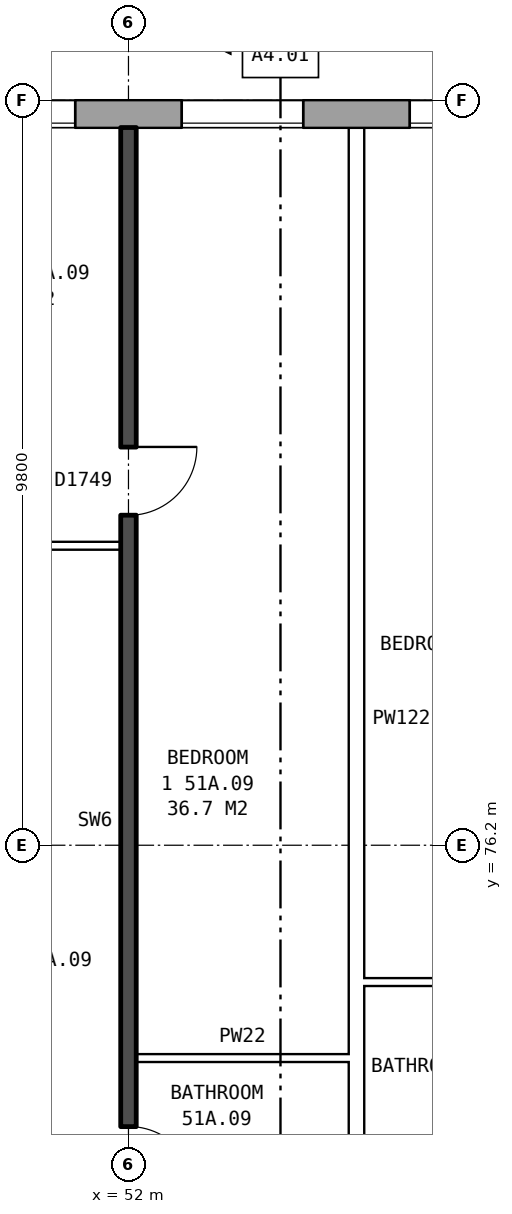
"""IFC4 building model, lengths in metres.
Left out: names, types, materials, properties, quantities, classifications, styles, units other than length and angle.
Written with IfcOpenShell. Run it as: python <this file> out.ifc"""

import sys

from ifc_helpers import new_model, si_unit, direction, frame, frame_2d, origin, place, context, subcontext, project, spatial, rectangle, extrude, element, fill, save


model = new_model("IFC4")
c1 = context("Model", 3, precision=1e-05, world=origin(), true_north=direction((0.0, 1.0)))
c2 = subcontext(c1, "Body", "Model", "MODEL_VIEW")
j1 = project(units=[si_unit("LENGTHUNIT", "METRE"), si_unit("PLANEANGLEUNIT", "RADIAN")], contexts=[c1])
p1 = place(None, origin())
s1 = spatial("IfcSite", under=j1, at=p1, CompositionType="ELEMENT")
p2 = place(p1, origin())
s2 = spatial("IfcBuilding", under=s1, at=p2, CompositionType="ELEMENT")
p3 = place(p2, frame((0.0, 0.0, 182.0)))
s3 = spatial("IfcBuildingStorey", under=s2, at=p3, CompositionType="ELEMENT", Elevation=182.0)
p4 = place(p3, frame((72.925, 85.82, 0.0), z_axis=(0.0, 0.0, 1.0), x_axis=(-1.0, 0.0, 0.0)))
e1 = element("IfcWall", 1, at=p4, inside=s3, PredefinedType="STANDARD", context=c2, shape_type="SweptSolid", body=[
    extrude(rectangle(XDim=39.601, YDim=0.36, at=frame_2d((19.8, 0.0))), origin(), (0.0, 0.0, 1.0), 2.85),
])
p5 = place(p4, frame((0.625, 0.0, 0.8)))
e2 = element("IfcOpeningElement", 2, at=p5, cuts=e1, PredefinedType="OPENING", context=c2, shape_type="SweptSolid", body=[
    extrude(rectangle(XDim=1.6, YDim=1.8, at=frame_2d((0.8, 0.9))), frame((0.0, 0.19, 0.0), z_axis=(0.0, -1.0, 0.0), x_axis=(1.0, 0.0, 0.0)), (0.0, 0.0, 1.0), 0.38),
])
p6 = place(p4, frame((3.625, 0.0, 0.8)))
e3 = element("IfcOpeningElement", 3, at=p6, cuts=e1, PredefinedType="OPENING", context=c2, shape_type="SweptSolid", body=[
    extrude(rectangle(XDim=1.6, YDim=1.8, at=frame_2d((0.8, 0.9))), frame((0.0, 0.19, 0.0), z_axis=(0.0, -1.0, 0.0), x_axis=(1.0, 0.0, 0.0)), (0.0, 0.0, 1.0), 0.38),
])
p7 = place(p4, frame((6.625, 0.0, 0.8)))
e4 = element("IfcOpeningElement", 4, at=p7, cuts=e1, PredefinedType="OPENING", context=c2, shape_type="SweptSolid", body=[
    extrude(rectangle(XDim=1.6, YDim=1.8, at=frame_2d((0.8, 0.9))), frame((0.0, 0.19, 0.0), z_axis=(0.0, -1.0, 0.0), x_axis=(1.0, 0.0, 0.0)), (0.0, 0.0, 1.0), 0.38),
])
p8 = place(p4, frame((9.475, 0.0, 0.35)))
e5 = element("IfcOpeningElement", 5, at=p8, cuts=e1, PredefinedType="OPENING", context=c2, shape_type="SweptSolid", body=[
    extrude(rectangle(XDim=0.6, YDim=0.9, at=frame_2d((0.3, 0.45))), frame((0.0, 0.19, 0.0), z_axis=(0.0, -1.0, 0.0), x_axis=(1.0, 0.0, 0.0)), (0.0, 0.0, 1.0), 0.38),
])
p9 = place(p4, frame((12.625, 0.0, 0.8)))
e6 = element("IfcOpeningElement", 6, at=p9, cuts=e1, PredefinedType="OPENING", context=c2, shape_type="SweptSolid", body=[
    extrude(rectangle(XDim=1.6, YDim=1.8, at=frame_2d((0.8, 0.9))), frame((0.0, 0.19, 0.0), z_axis=(0.0, -1.0, 0.0), x_axis=(1.0, 0.0, 0.0)), (0.0, 0.0, 1.0), 0.38),
])
p10 = place(p4, frame((15.625, 0.0, 0.8)))
e7 = element("IfcOpeningElement", 7, at=p10, cuts=e1, PredefinedType="OPENING", context=c2, shape_type="SweptSolid", body=[
    extrude(rectangle(XDim=1.6, YDim=1.8, at=frame_2d((0.8, 0.9))), frame((0.0, 0.19, 0.0), z_axis=(0.0, -1.0, 0.0), x_axis=(1.0, 0.0, 0.0)), (0.0, 0.0, 1.0), 0.38),
])
p11 = place(p4, frame((18.625, 0.0, 0.8)))
e8 = element("IfcOpeningElement", 8, at=p11, cuts=e1, PredefinedType="OPENING", context=c2, shape_type="SweptSolid", body=[
    extrude(rectangle(XDim=1.6, YDim=1.8, at=frame_2d((0.8, 0.9))), frame((0.0, 0.19, 0.0), z_axis=(0.0, -1.0, 0.0), x_axis=(1.0, 0.0, 0.0)), (0.0, 0.0, 1.0), 0.38),
])
p12 = place(p4, frame((21.625, 0.0, 0.8)))
e9 = element("IfcOpeningElement", 9, at=p12, cuts=e1, PredefinedType="OPENING", context=c2, shape_type="SweptSolid", body=[
    extrude(rectangle(XDim=1.6, YDim=1.8, at=frame_2d((0.8, 0.9))), frame((0.0, 0.19, 0.0), z_axis=(0.0, -1.0, 0.0), x_axis=(1.0, 0.0, 0.0)), (0.0, 0.0, 1.0), 0.38),
])
p13 = place(p4, frame((24.625, 0.0, 0.8)))
e10 = element("IfcOpeningElement", 10, at=p13, cuts=e1, PredefinedType="OPENING", context=c2, shape_type="SweptSolid", body=[
    extrude(rectangle(XDim=1.6, YDim=1.8, at=frame_2d((0.8, 0.9))), frame((0.0, 0.19, 0.0), z_axis=(0.0, -1.0, 0.0), x_axis=(1.0, 0.0, 0.0)), (0.0, 0.0, 1.0), 0.38),
])
p14 = place(p4, frame((27.125, 0.0, 0.8)))
e11 = element("IfcOpeningElement", 11, at=p14, cuts=e1, PredefinedType="OPENING", context=c2, shape_type="SweptSolid", body=[
    extrude(rectangle(XDim=1.6, YDim=1.8, at=frame_2d((0.8, 0.9))), frame((0.0, 0.19, 0.0), z_axis=(0.0, -1.0, 0.0), x_axis=(1.0, 0.0, 0.0)), (0.0, 0.0, 1.0), 0.38),
])
p15 = place(p4, frame((29.025, 0.0, 0.8)))
e12 = element("IfcOpeningElement", 12, at=p15, cuts=e1, PredefinedType="OPENING", context=c2, shape_type="SweptSolid", body=[
    extrude(rectangle(XDim=0.6, YDim=0.9, at=frame_2d((0.3, 0.45))), frame((0.0, 0.19, 0.0), z_axis=(0.0, -1.0, 0.0), x_axis=(1.0, 0.0, 0.0)), (0.0, 0.0, 1.0), 0.38),
])
p16 = place(p4, frame((33.625, 0.0, 0.8)))
e13 = element("IfcOpeningElement", 13, at=p16, cuts=e1, PredefinedType="OPENING", context=c2, shape_type="SweptSolid", body=[
    extrude(rectangle(XDim=1.6, YDim=1.8, at=frame_2d((0.8, 0.9))), frame((0.0, 0.19, 0.0), z_axis=(0.0, -1.0, 0.0), x_axis=(1.0, 0.0, 0.0)), (0.0, 0.0, 1.0), 0.38),
])
p17 = place(p4, frame((36.625, 0.0, 0.8)))
e14 = element("IfcOpeningElement", 14, at=p17, cuts=e1, PredefinedType="OPENING", context=c2, shape_type="SweptSolid", body=[
    extrude(rectangle(XDim=1.6, YDim=1.8, at=frame_2d((0.8, 0.9))), frame((0.0, 0.19, 0.0), z_axis=(0.0, -1.0, 0.0), x_axis=(1.0, 0.0, 0.0)), (0.0, 0.0, 1.0), 0.38),
])
p18 = place(p4, frame((10.375, 0.0, 0.35)))
e15 = element("IfcOpeningElement", 15, at=p18, cuts=e1, PredefinedType="OPENING", context=c2, shape_type="SweptSolid", body=[
    extrude(rectangle(XDim=1.4, YDim=1.8, at=frame_2d((0.7, 0.9))), frame((0.0, 0.19, 0.0), z_axis=(0.0, -1.0, 0.0), x_axis=(1.0, 0.0, 0.0)), (0.0, 0.0, 1.0), 0.38),
])
p19 = place(p4, frame((30.775, 0.0, 1.7)))
e16 = element("IfcOpeningElement", 16, at=p19, cuts=e1, PredefinedType="OPENING", context=c2, shape_type="SweptSolid", body=[
    extrude(rectangle(XDim=0.6, YDim=0.9, at=frame_2d((0.3, 0.45))), frame((0.0, 0.19, 0.0), z_axis=(0.0, -1.0, 0.0), x_axis=(1.0, 0.0, 0.0)), (0.0, 0.0, 1.0), 0.38),
])
p20 = place(p4, frame((31.675, 0.0, 0.8)))
e17 = element("IfcOpeningElement", 17, at=p20, cuts=e1, PredefinedType="OPENING", context=c2, shape_type="SweptSolid", body=[
    extrude(rectangle(XDim=1.0, YDim=1.8, at=frame_2d((0.5, 0.9))), frame((0.0, 0.19, 0.0), z_axis=(0.0, -1.0, 0.0), x_axis=(1.0, 0.0, 0.0)), (0.0, 0.0, 1.0), 0.38),
])
for number, where, z_axis, x_axis in (
    (18, (52.1, 73.4, 0.0), (0.0, 0.0, 1.0), (1.0, 0.0, 0.0)),
    (19, (55.1, 74.4, 0.0), (0.0, 0.0, 1.0), (1.0, 0.0, 0.0)),
):
    element("IfcWall", number, at=place(p3, frame(where, z_axis=z_axis, x_axis=x_axis)), inside=s3, PredefinedType="PARTITIONING", context=c2, shape_type="SweptSolid", body=[
        extrude(rectangle(XDim=2.8, YDim=0.1, at=frame_2d((1.4, 0.0))), origin(), (0.0, 0.0, 1.0), 2.85),
    ])
p21 = place(p3, frame((49.0, 80.14, 0.0), z_axis=(0.0, 0.0, 1.0), x_axis=(1.0, 0.0, 0.0)))
e20 = element("IfcWall", 20, at=p21, inside=s3, PredefinedType="PARTITIONING", context=c2, shape_type="SweptSolid", body=[
    extrude(rectangle(XDim=2.9, YDim=0.1, at=frame_2d((1.45, 0.0))), origin(), (0.0, 0.0, 1.0), 2.85),
])
p22 = place(p21, frame((1.0, 0.0, 0.0)))
e21 = element("IfcOpeningElement", 21, at=p22, cuts=e20, PredefinedType="OPENING", context=c2, shape_type="SweptSolid", body=[
    extrude(rectangle(XDim=0.9, YDim=2.1, at=frame_2d((0.45, 1.05))), frame((0.0, 0.06, 0.0), z_axis=(0.0, -1.0, 0.0), x_axis=(1.0, 0.0, 0.0)), (0.0, 0.0, 1.0), 0.12),
])
p23 = place(p3, frame((52.0, 71.2, 0.0), z_axis=(0.0, 0.0, 1.0), x_axis=(0.0, 1.0, 0.0)))
e22 = element("IfcWall", 22, at=p23, inside=s3, PredefinedType="SOLIDWALL", context=c2, shape_type="SweptSolid", body=[
    extrude(rectangle(XDim=14.44, YDim=0.2, at=frame_2d((7.22, 0.0))), origin(), (0.0, 0.0, 1.0), 2.85),
])
p24 = place(p23, frame((9.34, 0.0, 0.0)))
e23 = element("IfcOpeningElement", 23, at=p24, cuts=e22, PredefinedType="OPENING", context=c2, shape_type="SweptSolid", body=[
    extrude(rectangle(XDim=0.9, YDim=2.1, at=frame_2d((0.45, 1.05))), frame((0.0, 0.11, 0.0), z_axis=(0.0, -1.0, 0.0), x_axis=(1.0, 0.0, 0.0)), (0.0, 0.0, 1.0), 0.22),
])
p25 = place(p23, frame((0.4, 0.0, 0.0)))
e24 = element("IfcOpeningElement", 24, at=p25, cuts=e22, PredefinedType="OPENING", context=c2, shape_type="SweptSolid", body=[
    extrude(rectangle(XDim=0.9, YDim=2.1, at=frame_2d((0.45, 1.05))), frame((0.0, 0.11, 0.0), z_axis=(0.0, -1.0, 0.0), x_axis=(1.0, 0.0, 0.0)), (0.0, 0.0, 1.0), 0.22),
])
p26 = place(p3, frame((55.0, 71.3, 0.0), z_axis=(0.0, 0.0, 1.0), x_axis=(0.0, 1.0, 0.0)))
e25 = element("IfcWall", 25, at=p26, inside=s3, PredefinedType="PARTITIONING", context=c2, shape_type="SweptSolid", body=[
    extrude(rectangle(XDim=14.34, YDim=0.2, at=frame_2d((7.17, 0.0))), origin(), (0.0, 0.0, 1.0), 2.85),
])
p27 = place(p10, origin())
e26 = element("IfcWindow", 26, at=p27, inside=s3, PartitioningType="SINGLE_PANEL", PredefinedType="WINDOW", context=c2, shape_type="SweptSolid", body=[
    extrude(rectangle(XDim=1.6, YDim=1.8, at=frame_2d((0.8, 0.9))), frame((0.0, 0.15, 0.0), z_axis=(0.0, -1.0, 0.0), x_axis=(1.0, 0.0, 0.0)), (0.0, 0.0, 1.0), 0.06),
])
fill(e7, e26)
p28 = place(p11, origin())
e27 = element("IfcWindow", 27, at=p28, inside=s3, PartitioningType="SINGLE_PANEL", PredefinedType="WINDOW", context=c2, shape_type="SweptSolid", body=[
    extrude(rectangle(XDim=1.6, YDim=1.8, at=frame_2d((0.8, 0.9))), frame((0.0, 0.15, 0.0), z_axis=(0.0, -1.0, 0.0), x_axis=(1.0, 0.0, 0.0)), (0.0, 0.0, 1.0), 0.06),
])
fill(e8, e27)
p29 = place(p12, origin())
e28 = element("IfcWindow", 28, at=p29, inside=s3, PartitioningType="SINGLE_PANEL", PredefinedType="WINDOW", context=c2, shape_type="SweptSolid", body=[
    extrude(rectangle(XDim=1.6, YDim=1.8, at=frame_2d((0.8, 0.9))), frame((0.0, 0.15, 0.0), z_axis=(0.0, -1.0, 0.0), x_axis=(1.0, 0.0, 0.0)), (0.0, 0.0, 1.0), 0.06),
])
fill(e9, e28)
p30 = place(p24, frame((0.9, 0.0, 0.0), z_axis=(0.0, 0.0, 1.0), x_axis=(-1.0, 0.0, 0.0)))
e29 = element("IfcDoor", 29, at=p30, inside=s3, OperationType="SINGLE_SWING_LEFT", PredefinedType="DOOR", context=c2, shape_type="SweptSolid", body=[
    extrude(rectangle(XDim=0.9, YDim=2.1, at=frame_2d((0.45, 1.05))), frame((0.0, 0.025, 0.0), z_axis=(0.0, -1.0, 0.0), x_axis=(1.0, 0.0, 0.0)), (0.0, 0.0, 1.0), 0.05),
])
fill(e23, e29)
p31 = place(p25, frame((0.9, 0.0, 0.0), z_axis=(0.0, 0.0, 1.0), x_axis=(-1.0, 0.0, 0.0)))
e30 = element("IfcDoor", 30, at=p31, inside=s3, OperationType="SINGLE_SWING_RIGHT", PredefinedType="DOOR", context=c2, shape_type="SweptSolid", body=[
    extrude(rectangle(XDim=0.9, YDim=2.1, at=frame_2d((0.45, 1.05))), frame((0.0, 0.025, 0.0), z_axis=(0.0, -1.0, 0.0), x_axis=(1.0, 0.0, 0.0)), (0.0, 0.0, 1.0), 0.05),
])
fill(e24, e30)
save(model, sys.argv[1])
